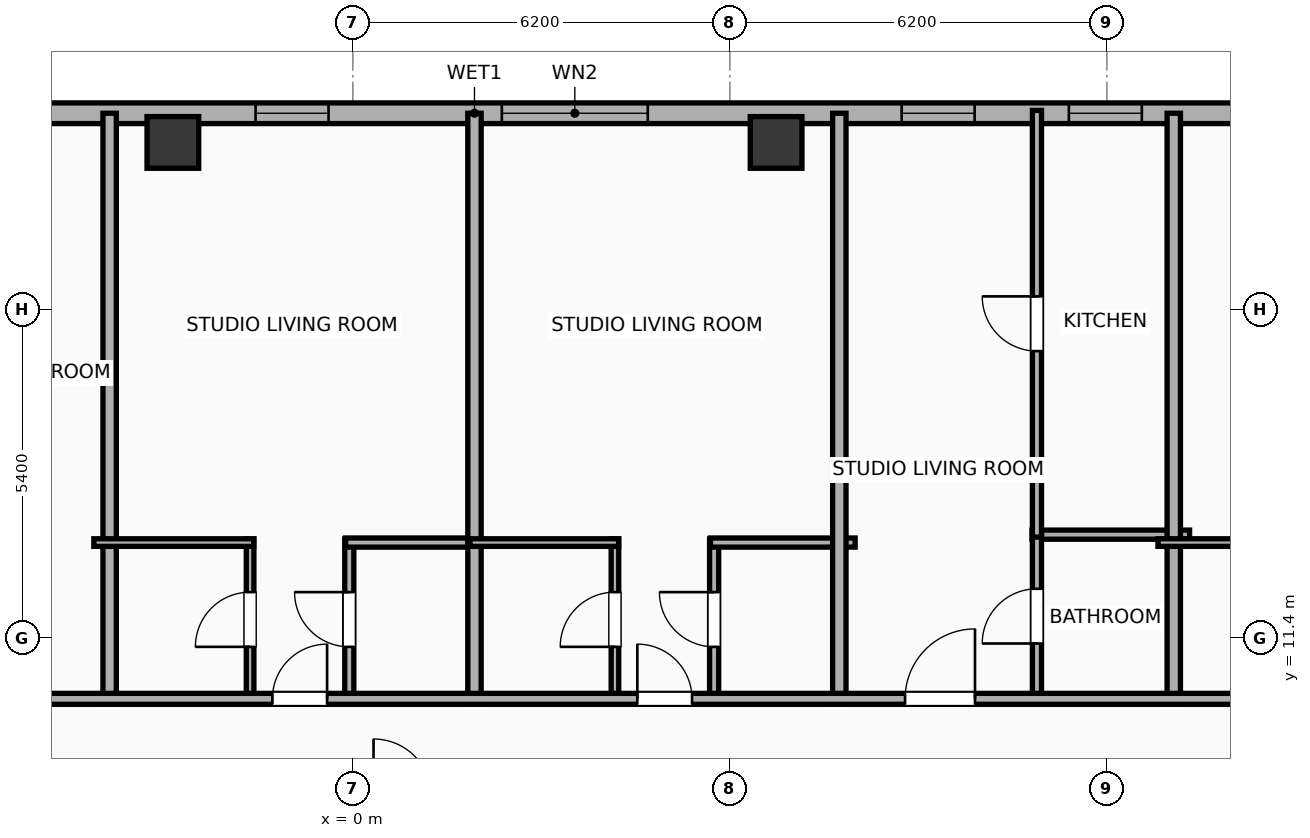
"""IFC4 building model, lengths in metres.
Left out: names, types, materials, properties, quantities, classifications, styles, units other than length and angle.
Written with IfcOpenShell. Run it as: python <this file> out.ifc"""

import sys

from ifc_helpers import new_model, si_unit, direction, frame, frame_2d, origin, origin_2d, place, context, subcontext, project, spatial, rectangle, hollow_rectangle, extrude, element, fill, save


model = new_model("IFC4")
c1 = context("Model", 3, precision=1e-05, world=origin(), true_north=direction((0.0, 1.0)))
c2 = subcontext(c1, "Body", "Model", "MODEL_VIEW")
j1 = project(units=[si_unit("LENGTHUNIT", "METRE"), si_unit("PLANEANGLEUNIT", "RADIAN")], contexts=[c1])
p1 = place(None, origin())
s1 = spatial("IfcSite", under=j1, at=p1, CompositionType="ELEMENT")
p2 = place(p1, origin())
s2 = spatial("IfcBuilding", under=s1, at=p2, CompositionType="ELEMENT")
p3 = place(p2, frame((0.0, 0.0, 208.0)))
s3 = spatial("IfcBuildingStorey", under=s2, at=p3, CompositionType="ELEMENT", Elevation=208.0)
for number, where, z_axis, x_axis in (
    (1, (6.96, 19.55, 0.0), (0.0, 0.0, 1.0), (1.0, 0.0, 0.0)),
    (2, (-2.96, 19.55, 0.0), (0.0, 0.0, 1.0), (1.0, 0.0, 0.0)),
):
    element("IfcColumn", number, at=place(p3, frame(where, z_axis=z_axis, x_axis=x_axis)), inside=s3, PredefinedType="COLUMN", context=c2, shape_type="SweptSolid", body=[
        extrude(hollow_rectangle(XDim=0.85, YDim=0.85, WallThickness=0.028, at=origin_2d()), origin(), (0.0, 0.0, 1.0), 3.9),
    ])
p4 = place(p3, frame((-22.783, 20.03, 0.0), z_axis=(0.0, 0.0, 1.0), x_axis=(1.0, 0.0, 0.0)))
e3 = element("IfcWall", 3, at=p4, inside=s3, PredefinedType="ELEMENTEDWALL", context=c2, shape_type="SweptSolid", body=[
    extrude(rectangle(XDim=49.566, YDim=0.34, at=frame_2d((24.783, 0.0))), origin(), (0.0, 0.0, 1.0), 3.65),
])
p5 = place(p4, frame((25.233, 0.0, 0.75)))
e4 = element("IfcOpeningElement", 4, at=p5, cuts=e3, PredefinedType="OPENING", context=c2, shape_type="SweptSolid", body=[
    extrude(rectangle(XDim=2.4, YDim=2.1, at=frame_2d((1.2, 1.05))), frame((0.0, 0.18, 0.0), z_axis=(0.0, -1.0, 0.0), x_axis=(1.0, 0.0, 0.0)), (0.0, 0.0, 1.0), 0.36),
])
p6 = place(p4, frame((1.532, 0.0, 0.75)))
e5 = element("IfcOpeningElement", 5, at=p6, cuts=e3, PredefinedType="OPENING", context=c2, shape_type="SweptSolid", body=[
    extrude(rectangle(XDim=1.2, YDim=2.05, at=frame_2d((0.6, 1.025))), frame((0.0, 0.18, 0.0), z_axis=(0.0, -1.0, 0.0), x_axis=(1.0, 0.0, 0.0)), (0.0, 0.0, 1.0), 0.36),
])
p7 = place(p4, frame((4.478, 0.0, 0.75)))
e6 = element("IfcOpeningElement", 6, at=p7, cuts=e3, PredefinedType="OPENING", context=c2, shape_type="SweptSolid", body=[
    extrude(rectangle(XDim=1.2, YDim=2.05, at=frame_2d((0.6, 1.025))), frame((0.0, 0.18, 0.0), z_axis=(0.0, -1.0, 0.0), x_axis=(1.0, 0.0, 0.0)), (0.0, 0.0, 1.0), 0.36),
])
p8 = place(p4, frame((7.983, 0.0, 0.75)))
e7 = element("IfcOpeningElement", 7, at=p8, cuts=e3, PredefinedType="OPENING", context=c2, shape_type="SweptSolid", body=[
    extrude(rectangle(XDim=1.2, YDim=2.05, at=frame_2d((0.6, 1.025))), frame((0.0, 0.18, 0.0), z_axis=(0.0, -1.0, 0.0), x_axis=(1.0, 0.0, 0.0)), (0.0, 0.0, 1.0), 0.36),
])
p9 = place(p4, frame((16.46, 0.0, 0.75)))
e8 = element("IfcOpeningElement", 8, at=p9, cuts=e3, PredefinedType="OPENING", context=c2, shape_type="SweptSolid", body=[
    extrude(rectangle(XDim=1.2, YDim=2.05, at=frame_2d((0.6, 1.025))), frame((0.0, 0.18, 0.0), z_axis=(0.0, -1.0, 0.0), x_axis=(1.0, 0.0, 0.0)), (0.0, 0.0, 1.0), 0.36),
])
p10 = place(p4, frame((13.46, 0.0, 0.75)))
e9 = element("IfcOpeningElement", 9, at=p10, cuts=e3, PredefinedType="OPENING", context=c2, shape_type="SweptSolid", body=[
    extrude(rectangle(XDim=1.2, YDim=2.05, at=frame_2d((0.6, 1.025))), frame((0.0, 0.18, 0.0), z_axis=(0.0, -1.0, 0.0), x_axis=(1.0, 0.0, 0.0)), (0.0, 0.0, 1.0), 0.36),
])
p11 = place(p4, frame((21.183, 0.0, 0.75)))
e10 = element("IfcOpeningElement", 10, at=p11, cuts=e3, PredefinedType="OPENING", context=c2, shape_type="SweptSolid", body=[
    extrude(rectangle(XDim=1.2, YDim=2.05, at=frame_2d((0.6, 1.025))), frame((0.0, 0.18, 0.0), z_axis=(0.0, -1.0, 0.0), x_axis=(1.0, 0.0, 0.0)), (0.0, 0.0, 1.0), 0.36),
])
p12 = place(p4, frame((31.808, 0.0, 0.75)))
e11 = element("IfcOpeningElement", 11, at=p12, cuts=e3, PredefinedType="OPENING", context=c2, shape_type="SweptSolid", body=[
    extrude(rectangle(XDim=1.2, YDim=2.05, at=frame_2d((0.6, 1.025))), frame((0.0, 0.18, 0.0), z_axis=(0.0, -1.0, 0.0), x_axis=(1.0, 0.0, 0.0)), (0.0, 0.0, 1.0), 0.36),
])
p13 = place(p4, frame((34.558, 0.0, 0.75)))
e12 = element("IfcOpeningElement", 12, at=p13, cuts=e3, PredefinedType="OPENING", context=c2, shape_type="SweptSolid", body=[
    extrude(rectangle(XDim=1.2, YDim=2.05, at=frame_2d((0.6, 1.025))), frame((0.0, 0.18, 0.0), z_axis=(0.0, -1.0, 0.0), x_axis=(1.0, 0.0, 0.0)), (0.0, 0.0, 1.0), 0.36),
])
p14 = place(p4, frame((37.833, 0.0, 0.75)))
e13 = element("IfcOpeningElement", 13, at=p14, cuts=e3, PredefinedType="OPENING", context=c2, shape_type="SweptSolid", body=[
    extrude(rectangle(XDim=1.2, YDim=2.05, at=frame_2d((0.6, 1.025))), frame((0.0, 0.18, 0.0), z_axis=(0.0, -1.0, 0.0), x_axis=(1.0, 0.0, 0.0)), (0.0, 0.0, 1.0), 0.36),
])
p15 = place(p4, frame((42.797, 0.0, 0.75)))
e14 = element("IfcOpeningElement", 14, at=p15, cuts=e3, PredefinedType="OPENING", context=c2, shape_type="SweptSolid", body=[
    extrude(rectangle(XDim=1.2, YDim=2.05, at=frame_2d((0.6, 1.025))), frame((0.0, 0.18, 0.0), z_axis=(0.0, -1.0, 0.0), x_axis=(1.0, 0.0, 0.0)), (0.0, 0.0, 1.0), 0.36),
])
p16 = place(p4, frame((45.606, 0.0, 0.75)))
e15 = element("IfcOpeningElement", 15, at=p16, cuts=e3, PredefinedType="OPENING", context=c2, shape_type="SweptSolid", body=[
    extrude(rectangle(XDim=1.2, YDim=2.05, at=frame_2d((0.6, 1.025))), frame((0.0, 0.18, 0.0), z_axis=(0.0, -1.0, 0.0), x_axis=(1.0, 0.0, 0.0)), (0.0, 0.0, 1.0), 0.36),
])
p17 = place(p4, frame((47.679, 0.0, 0.75)))
e16 = element("IfcOpeningElement", 16, at=p17, cuts=e3, PredefinedType="OPENING", context=c2, shape_type="SweptSolid", body=[
    extrude(rectangle(XDim=1.2, YDim=2.05, at=frame_2d((0.6, 1.025))), frame((0.0, 0.18, 0.0), z_axis=(0.0, -1.0, 0.0), x_axis=(1.0, 0.0, 0.0)), (0.0, 0.0, 1.0), 0.36),
])
p18 = place(p3, frame((-4.0, 10.32, 0.0), z_axis=(0.0, 0.0, 1.0), x_axis=(0.0, 1.0, 0.0)))
e17 = element("IfcWall", 17, at=p18, inside=s3, PredefinedType="PARTITIONING", context=c2, shape_type="SweptSolid", body=[
    extrude(rectangle(XDim=9.71, YDim=0.22, at=frame_2d((4.855, 0.0))), origin(), (0.0, 0.0, 1.0), 3.09),
])
p19 = place(p3, frame((-1.69, 10.38, 0.0), z_axis=(0.0, 0.0, 1.0), x_axis=(0.0, 1.0, 0.0)))
e18 = element("IfcWall", 18, at=p19, inside=s3, PredefinedType="PARTITIONING", context=c2, shape_type="SweptSolid", body=[
    extrude(rectangle(XDim=2.65, YDim=0.125, at=frame_2d((1.325, 0.0))), origin(), (0.0, 0.0, 1.0), 3.65),
])
p20 = place(p19, frame((0.875, 0.0, 0.0)))
e19 = element("IfcOpeningElement", 19, at=p20, cuts=e18, PredefinedType="OPENING", context=c2, shape_type="SweptSolid", body=[
    extrude(rectangle(XDim=0.9, YDim=2.05, at=frame_2d((0.45, 1.025))), frame((0.0, 0.073, 0.0), z_axis=(0.0, -1.0, 0.0), x_axis=(1.0, 0.0, 0.0)), (0.0, 0.0, 1.0), 0.145),
])
p21 = place(p3, frame((-0.059, 10.38, 0.0), z_axis=(0.0, 0.0, 1.0), x_axis=(0.0, 1.0, 0.0)))
e20 = element("IfcWall", 20, at=p21, inside=s3, PredefinedType="PLUMBINGWALL", context=c2, shape_type="SweptSolid", body=[
    extrude(rectangle(XDim=2.65, YDim=0.15, at=frame_2d((1.325, 0.0))), origin(), (0.0, 0.0, 1.0), 3.65),
])
p22 = place(p21, frame((0.875, 0.0, 0.0)))
e21 = element("IfcOpeningElement", 21, at=p22, cuts=e20, PredefinedType="OPENING", context=c2, shape_type="SweptSolid", body=[
    extrude(rectangle(XDim=0.9, YDim=2.05, at=frame_2d((0.45, 1.025))), frame((0.0, 0.085, 0.0), z_axis=(0.0, -1.0, 0.0), x_axis=(1.0, 0.0, 0.0)), (0.0, 0.0, 1.0), 0.17),
])
p23 = place(p3, frame((-4.26, 12.97, 0.0), z_axis=(0.0, 0.0, 1.0), x_axis=(1.0, 0.0, 0.0)))
e22 = element("IfcWall", 22, at=p23, inside=s3, PredefinedType="PARTITIONING", context=c2, shape_type="SweptSolid", body=[
    extrude(rectangle(XDim=2.63, YDim=0.125, at=frame_2d((1.315, 0.0))), origin(), (0.0, 0.0, 1.0), 3.65),
])
p24 = place(p3, frame((-0.119, 12.97, 0.0), z_axis=(0.0, 0.0, 1.0), x_axis=(1.0, 0.0, 0.0)))
e23 = element("IfcWall", 23, at=p24, inside=s3, PredefinedType="PLUMBINGWALL", context=c2, shape_type="SweptSolid", body=[
    extrude(rectangle(XDim=2.194, YDim=0.15, at=frame_2d((1.097, 0.0))), origin(), (0.0, 0.0, 1.0), 3.65),
])
p25 = place(p3, frame((2.0, 10.32, 0.0), z_axis=(0.0, 0.0, 1.0), x_axis=(0.0, 1.0, 0.0)))
e24 = element("IfcWall", 24, at=p25, inside=s3, PredefinedType="PARTITIONING", context=c2, shape_type="SweptSolid", body=[
    extrude(rectangle(XDim=9.71, YDim=0.22, at=frame_2d((4.855, 0.0))), origin(), (0.0, 0.0, 1.0), 3.65),
])
p26 = place(p3, frame((4.31, 10.38, 0.0), z_axis=(0.0, 0.0, 1.0), x_axis=(0.0, 1.0, 0.0)))
e25 = element("IfcWall", 25, at=p26, inside=s3, PredefinedType="PARTITIONING", context=c2, shape_type="SweptSolid", body=[
    extrude(rectangle(XDim=2.65, YDim=0.125, at=frame_2d((1.325, 0.0))), origin(), (0.0, 0.0, 1.0), 3.65),
])
p27 = place(p26, frame((0.875, 0.0, 0.0)))
e26 = element("IfcOpeningElement", 26, at=p27, cuts=e25, PredefinedType="OPENING", context=c2, shape_type="SweptSolid", body=[
    extrude(rectangle(XDim=0.9, YDim=2.05, at=frame_2d((0.45, 1.025))), frame((0.0, 0.073, 0.0), z_axis=(0.0, -1.0, 0.0), x_axis=(1.0, 0.0, 0.0)), (0.0, 0.0, 1.0), 0.145),
])
p28 = place(p3, frame((5.941, 10.38, 0.0), z_axis=(0.0, 0.0, 1.0), x_axis=(0.0, 1.0, 0.0)))
e27 = element("IfcWall", 27, at=p28, inside=s3, PredefinedType="PLUMBINGWALL", context=c2, shape_type="SweptSolid", body=[
    extrude(rectangle(XDim=2.65, YDim=0.15, at=frame_2d((1.325, 0.0))), origin(), (0.0, 0.0, 1.0), 3.65),
])
p29 = place(p28, frame((0.875, 0.0, 0.0)))
e28 = element("IfcOpeningElement", 28, at=p29, cuts=e27, PredefinedType="OPENING", context=c2, shape_type="SweptSolid", body=[
    extrude(rectangle(XDim=0.9, YDim=2.05, at=frame_2d((0.45, 1.025))), frame((0.0, 0.085, 0.0), z_axis=(0.0, -1.0, 0.0), x_axis=(1.0, 0.0, 0.0)), (0.0, 0.0, 1.0), 0.17),
])
p30 = place(p3, frame((1.925, 12.97, 0.0), z_axis=(0.0, 0.0, 1.0), x_axis=(1.0, 0.0, 0.0)))
e29 = element("IfcWall", 29, at=p30, inside=s3, PredefinedType="PARTITIONING", context=c2, shape_type="SweptSolid", body=[
    extrude(rectangle(XDim=2.445, YDim=0.125, at=frame_2d((1.223, 0.0))), origin(), (0.0, 0.0, 1.0), 3.65),
])
p31 = place(p3, frame((5.881, 12.97, 0.0), z_axis=(0.0, 0.0, 1.0), x_axis=(1.0, 0.0, 0.0)))
e30 = element("IfcWall", 30, at=p31, inside=s3, PredefinedType="PLUMBINGWALL", context=c2, shape_type="SweptSolid", body=[
    extrude(rectangle(XDim=2.379, YDim=0.15, at=frame_2d((1.189, 0.0))), origin(), (0.0, 0.0, 1.0), 3.65),
])
p32 = place(p3, frame((8.0, 10.32, 0.0), z_axis=(0.0, 0.0, 1.0), x_axis=(0.0, 1.0, 0.0)))
e31 = element("IfcWall", 31, at=p32, inside=s3, PredefinedType="PARTITIONING", context=c2, shape_type="SweptSolid", body=[
    extrude(rectangle(XDim=9.71, YDim=0.22, at=frame_2d((4.855, 0.0))), origin(), (0.0, 0.0, 1.0), 3.65),
])
p33 = place(p3, frame((11.17, 13.1, 0.0), z_axis=(0.0, 0.0, 1.0), x_axis=(1.0, 0.0, 0.0)))
e32 = element("IfcWall", 32, at=p33, inside=s3, PredefinedType="PLUMBINGWALL", context=c2, shape_type="SweptSolid", body=[
    extrude(rectangle(XDim=2.59, YDim=0.15, at=frame_2d((1.295, 0.0))), origin(), (0.0, 0.0, 1.0), 3.65),
])
p34 = place(p3, frame((11.25, 10.38, 0.0), z_axis=(0.0, 0.0, 1.0), x_axis=(0.0, 1.0, 0.0)))
e33 = element("IfcWall", 33, at=p34, inside=s3, PredefinedType="PLUMBINGWALL", context=c2, shape_type="SweptSolid", body=[
    extrude(rectangle(XDim=2.76, YDim=0.15, at=frame_2d((1.38, 0.0))), origin(), (0.0, 0.0, 1.0), 3.65),
])
p35 = place(p34, frame((0.93, 0.0, 0.0)))
e34 = element("IfcOpeningElement", 34, at=p35, cuts=e33, PredefinedType="OPENING", context=c2, shape_type="SweptSolid", body=[
    extrude(rectangle(XDim=0.9, YDim=2.05, at=frame_2d((0.45, 1.025))), frame((0.0, 0.085, 0.0), z_axis=(0.0, -1.0, 0.0), x_axis=(1.0, 0.0, 0.0)), (0.0, 0.0, 1.0), 0.17),
])
p36 = place(p3, frame((11.25, 13.06, 0.0), z_axis=(0.0, 0.0, 1.0), x_axis=(0.0, 1.0, 0.0)))
e35 = element("IfcWall", 35, at=p36, inside=s3, PredefinedType="PLUMBINGWALL", context=c2, shape_type="SweptSolid", body=[
    extrude(rectangle(XDim=7.017, YDim=0.15, at=frame_2d((3.508, 0.0))), origin(), (0.0, 0.0, 1.0), 3.65),
])
p37 = place(p36, frame((3.058, 0.0, 0.0)))
e36 = element("IfcOpeningElement", 36, at=p37, cuts=e35, PredefinedType="OPENING", context=c2, shape_type="SweptSolid", body=[
    extrude(rectangle(XDim=0.9, YDim=2.05, at=frame_2d((0.45, 1.025))), frame((0.0, 0.085, 0.0), z_axis=(0.0, -1.0, 0.0), x_axis=(1.0, 0.0, 0.0)), (0.0, 0.0, 1.0), 0.17),
])
p38 = place(p3, frame((13.5, 10.32, 0.0), z_axis=(0.0, 0.0, 1.0), x_axis=(0.0, 1.0, 0.0)))
e37 = element("IfcWall", 37, at=p38, inside=s3, PredefinedType="PARTITIONING", context=c2, shape_type="SweptSolid", body=[
    extrude(rectangle(XDim=9.71, YDim=0.22, at=frame_2d((4.855, 0.0))), origin(), (0.0, 0.0, 1.0), 3.65),
])
p39 = place(p3, frame((13.24, 12.97, 0.0), z_axis=(0.0, 0.0, 1.0), x_axis=(1.0, 0.0, 0.0)))
e38 = element("IfcWall", 38, at=p39, inside=s3, PredefinedType="PARTITIONING", context=c2, shape_type="SweptSolid", body=[
    extrude(rectangle(XDim=2.63, YDim=0.125, at=frame_2d((1.315, 0.0))), origin(), (0.0, 0.0, 1.0), 3.65),
])
p40 = place(p3, frame((-26.23, 10.4, 0.0), z_axis=(0.0, 0.0, 1.0), x_axis=(1.0, 0.0, 0.0)))
e39 = element("IfcWall", 39, at=p40, inside=s3, PredefinedType="PARTITIONING", context=c2, shape_type="SweptSolid", body=[
    extrude(rectangle(XDim=56.46, YDim=0.18, at=frame_2d((28.23, 0.0))), origin(), (0.0, 0.0, 1.0), 3.65),
])
p41 = place(p40, frame((4.919, 0.0, 0.0)))
e40 = element("IfcOpeningElement", 40, at=p41, cuts=e39, PredefinedType="OPENING", context=c2, shape_type="SweptSolid", body=[
    extrude(rectangle(XDim=1.15, YDim=2.05, at=frame_2d((0.575, 1.025))), frame((0.0, 0.1, 0.0), z_axis=(0.0, -1.0, 0.0), x_axis=(1.0, 0.0, 0.0)), (0.0, 0.0, 1.0), 0.2),
])
p42 = place(p40, frame((12.903, 0.0, 0.0)))
e41 = element("IfcOpeningElement", 41, at=p42, cuts=e39, PredefinedType="OPENING", context=c2, shape_type="SweptSolid", body=[
    extrude(rectangle(XDim=0.9, YDim=2.05, at=frame_2d((0.45, 1.025))), frame((0.0, 0.1, 0.0), z_axis=(0.0, -1.0, 0.0), x_axis=(1.0, 0.0, 0.0)), (0.0, 0.0, 1.0), 0.2),
])
p43 = place(p40, frame((19.903, 0.0, 0.0)))
e42 = element("IfcOpeningElement", 42, at=p43, cuts=e39, PredefinedType="OPENING", context=c2, shape_type="SweptSolid", body=[
    extrude(rectangle(XDim=1.15, YDim=2.05, at=frame_2d((0.575, 1.025))), frame((0.0, 0.1, 0.0), z_axis=(0.0, -1.0, 0.0), x_axis=(1.0, 0.0, 0.0)), (0.0, 0.0, 1.0), 0.2),
])
p44 = place(p40, frame((24.906, 0.0, 0.0)))
e43 = element("IfcOpeningElement", 43, at=p44, cuts=e39, PredefinedType="OPENING", context=c2, shape_type="SweptSolid", body=[
    extrude(rectangle(XDim=0.9, YDim=2.05, at=frame_2d((0.45, 1.025))), frame((0.0, 0.1, 0.0), z_axis=(0.0, -1.0, 0.0), x_axis=(1.0, 0.0, 0.0)), (0.0, 0.0, 1.0), 0.2),
])
p45 = place(p40, frame((30.908, 0.0, 0.0)))
e44 = element("IfcOpeningElement", 44, at=p45, cuts=e39, PredefinedType="OPENING", context=c2, shape_type="SweptSolid", body=[
    extrude(rectangle(XDim=0.9, YDim=2.05, at=frame_2d((0.45, 1.025))), frame((0.0, 0.1, 0.0), z_axis=(0.0, -1.0, 0.0), x_axis=(1.0, 0.0, 0.0)), (0.0, 0.0, 1.0), 0.2),
])
p46 = place(p40, frame((35.311, 0.0, 0.0)))
e45 = element("IfcOpeningElement", 45, at=p46, cuts=e39, PredefinedType="OPENING", context=c2, shape_type="SweptSolid", body=[
    extrude(rectangle(XDim=1.15, YDim=2.05, at=frame_2d((0.575, 1.025))), frame((0.0, 0.1, 0.0), z_axis=(0.0, -1.0, 0.0), x_axis=(1.0, 0.0, 0.0)), (0.0, 0.0, 1.0), 0.2),
])
p47 = place(p40, frame((42.24, 0.0, 0.0)))
e46 = element("IfcOpeningElement", 46, at=p47, cuts=e39, PredefinedType="OPENING", context=c2, shape_type="SweptSolid", body=[
    extrude(rectangle(XDim=0.9, YDim=2.05, at=frame_2d((0.45, 1.025))), frame((0.0, 0.1, 0.0), z_axis=(0.0, -1.0, 0.0), x_axis=(1.0, 0.0, 0.0)), (0.0, 0.0, 1.0), 0.2),
])
p48 = place(p40, frame((46.298, 0.0, 0.0)))
e47 = element("IfcOpeningElement", 47, at=p48, cuts=e39, PredefinedType="OPENING", context=c2, shape_type="SweptSolid", body=[
    extrude(rectangle(XDim=1.15, YDim=2.05, at=frame_2d((0.575, 1.025))), frame((0.0, 0.1, 0.0), z_axis=(0.0, -1.0, 0.0), x_axis=(1.0, 0.0, 0.0)), (0.0, 0.0, 1.0), 0.2),
])
p49 = place(p40, frame((53.418, 0.0, 0.0)))
e48 = element("IfcOpeningElement", 48, at=p49, cuts=e39, PredefinedType="OPENING", context=c2, shape_type="SweptSolid", body=[
    extrude(rectangle(XDim=0.9, YDim=2.05, at=frame_2d((0.45, 1.025))), frame((0.0, 0.1, 0.0), z_axis=(0.0, -1.0, 0.0), x_axis=(1.0, 0.0, 0.0)), (0.0, 0.0, 1.0), 0.2),
])
p50 = place(p5, origin())
e49 = element("IfcWindow", 49, at=p50, inside=s3, PartitioningType="SINGLE_PANEL", PredefinedType="WINDOW", context=c2, shape_type="SweptSolid", body=[
    extrude(rectangle(XDim=2.4, YDim=2.1, at=frame_2d((1.2, 1.05))), frame((0.0, 0.03, 0.0), z_axis=(0.0, -1.0, 0.0), x_axis=(1.0, 0.0, 0.0)), (0.0, 0.0, 1.0), 0.06),
])
fill(e4, e49)
p51 = place(p11, origin())
e50 = element("IfcWindow", 50, at=p51, inside=s3, PartitioningType="SINGLE_PANEL", PredefinedType="WINDOW", context=c2, shape_type="SweptSolid", body=[
    extrude(rectangle(XDim=1.2, YDim=2.05, at=frame_2d((0.6, 1.025))), frame((0.0, 0.03, 0.0), z_axis=(0.0, -1.0, 0.0), x_axis=(1.0, 0.0, 0.0)), (0.0, 0.0, 1.0), 0.06),
])
fill(e10, e50)
p52 = place(p12, origin())
e51 = element("IfcWindow", 51, at=p52, inside=s3, PartitioningType="SINGLE_PANEL", PredefinedType="WINDOW", context=c2, shape_type="SweptSolid", body=[
    extrude(rectangle(XDim=1.2, YDim=2.05, at=frame_2d((0.6, 1.025))), frame((0.0, 0.03, 0.0), z_axis=(0.0, -1.0, 0.0), x_axis=(1.0, 0.0, 0.0)), (0.0, 0.0, 1.0), 0.06),
])
fill(e11, e51)
p53 = place(p13, origin())
e52 = element("IfcWindow", 52, at=p53, inside=s3, PartitioningType="SINGLE_PANEL", PredefinedType="WINDOW", context=c2, shape_type="SweptSolid", body=[
    extrude(rectangle(XDim=1.2, YDim=2.05, at=frame_2d((0.6, 1.025))), frame((0.0, 0.03, 0.0), z_axis=(0.0, -1.0, 0.0), x_axis=(1.0, 0.0, 0.0)), (0.0, 0.0, 1.0), 0.06),
])
fill(e12, e52)
p54 = place(p20, origin())
e53 = element("IfcDoor", 53, at=p54, inside=s3, OperationType="SINGLE_SWING_LEFT", PredefinedType="DOOR", context=c2, shape_type="SweptSolid", body=[
    extrude(rectangle(XDim=0.9, YDim=2.05, at=frame_2d((0.45, 1.025))), frame((0.0, 0.025, 0.0), z_axis=(0.0, -1.0, 0.0), x_axis=(1.0, 0.0, 0.0)), (0.0, 0.0, 1.0), 0.05),
])
fill(e19, e53)
p55 = place(p22, origin())
e54 = element("IfcDoor", 54, at=p55, inside=s3, OperationType="SINGLE_SWING_RIGHT", PredefinedType="DOOR", context=c2, shape_type="SweptSolid", body=[
    extrude(rectangle(XDim=0.9, YDim=2.05, at=frame_2d((0.45, 1.025))), frame((0.0, 0.025, 0.0), z_axis=(0.0, -1.0, 0.0), x_axis=(1.0, 0.0, 0.0)), (0.0, 0.0, 1.0), 0.05),
])
fill(e21, e54)
p56 = place(p27, origin())
e55 = element("IfcDoor", 55, at=p56, inside=s3, OperationType="SINGLE_SWING_LEFT", PredefinedType="DOOR", context=c2, shape_type="SweptSolid", body=[
    extrude(rectangle(XDim=0.9, YDim=2.05, at=frame_2d((0.45, 1.025))), frame((0.0, 0.025, 0.0), z_axis=(0.0, -1.0, 0.0), x_axis=(1.0, 0.0, 0.0)), (0.0, 0.0, 1.0), 0.05),
])
fill(e26, e55)
p57 = place(p29, origin())
e56 = element("IfcDoor", 56, at=p57, inside=s3, OperationType="SINGLE_SWING_RIGHT", PredefinedType="DOOR", context=c2, shape_type="SweptSolid", body=[
    extrude(rectangle(XDim=0.9, YDim=2.05, at=frame_2d((0.45, 1.025))), frame((0.0, 0.025, 0.0), z_axis=(0.0, -1.0, 0.0), x_axis=(1.0, 0.0, 0.0)), (0.0, 0.0, 1.0), 0.05),
])
fill(e28, e56)
p58 = place(p35, origin())
e57 = element("IfcDoor", 57, at=p58, inside=s3, OperationType="SINGLE_SWING_LEFT", PredefinedType="DOOR", context=c2, shape_type="SweptSolid", body=[
    extrude(rectangle(XDim=0.9, YDim=2.05, at=frame_2d((0.45, 1.025))), frame((0.0, 0.025, 0.0), z_axis=(0.0, -1.0, 0.0), x_axis=(1.0, 0.0, 0.0)), (0.0, 0.0, 1.0), 0.05),
])
fill(e34, e57)
p59 = place(p37, origin())
e58 = element("IfcDoor", 58, at=p59, inside=s3, OperationType="SINGLE_SWING_RIGHT", PredefinedType="DOOR", context=c2, shape_type="SweptSolid", body=[
    extrude(rectangle(XDim=0.9, YDim=2.05, at=frame_2d((0.45, 1.025))), frame((0.0, 0.025, 0.0), z_axis=(0.0, -1.0, 0.0), x_axis=(1.0, 0.0, 0.0)), (0.0, 0.0, 1.0), 0.05),
])
fill(e36, e58)
p60 = place(p44, origin())
e59 = element("IfcDoor", 59, at=p60, inside=s3, OperationType="SINGLE_SWING_RIGHT", PredefinedType="DOOR", context=c2, shape_type="SweptSolid", body=[
    extrude(rectangle(XDim=0.9, YDim=2.05, at=frame_2d((0.45, 1.025))), frame((0.0, 0.025, 0.0), z_axis=(0.0, -1.0, 0.0), x_axis=(1.0, 0.0, 0.0)), (0.0, 0.0, 1.0), 0.05),
])
fill(e43, e59)
p61 = place(p45, origin())
e60 = element("IfcDoor", 60, at=p61, inside=s3, OperationType="SINGLE_SWING_LEFT", PredefinedType="DOOR", context=c2, shape_type="SweptSolid", body=[
    extrude(rectangle(XDim=0.9, YDim=2.05, at=frame_2d((0.45, 1.025))), frame((0.0, 0.025, 0.0), z_axis=(0.0, -1.0, 0.0), x_axis=(1.0, 0.0, 0.0)), (0.0, 0.0, 1.0), 0.05),
])
fill(e44, e60)
p62 = place(p46, origin())
e61 = element("IfcDoor", 61, at=p62, inside=s3, OperationType="SINGLE_SWING_RIGHT", PredefinedType="DOOR", context=c2, shape_type="SweptSolid", body=[
    extrude(rectangle(XDim=1.15, YDim=2.05, at=frame_2d((0.575, 1.025))), frame((0.0, 0.025, 0.0), z_axis=(0.0, -1.0, 0.0), x_axis=(1.0, 0.0, 0.0)), (0.0, 0.0, 1.0), 0.05),
])
fill(e45, e61)
save(model, sys.argv[1])
